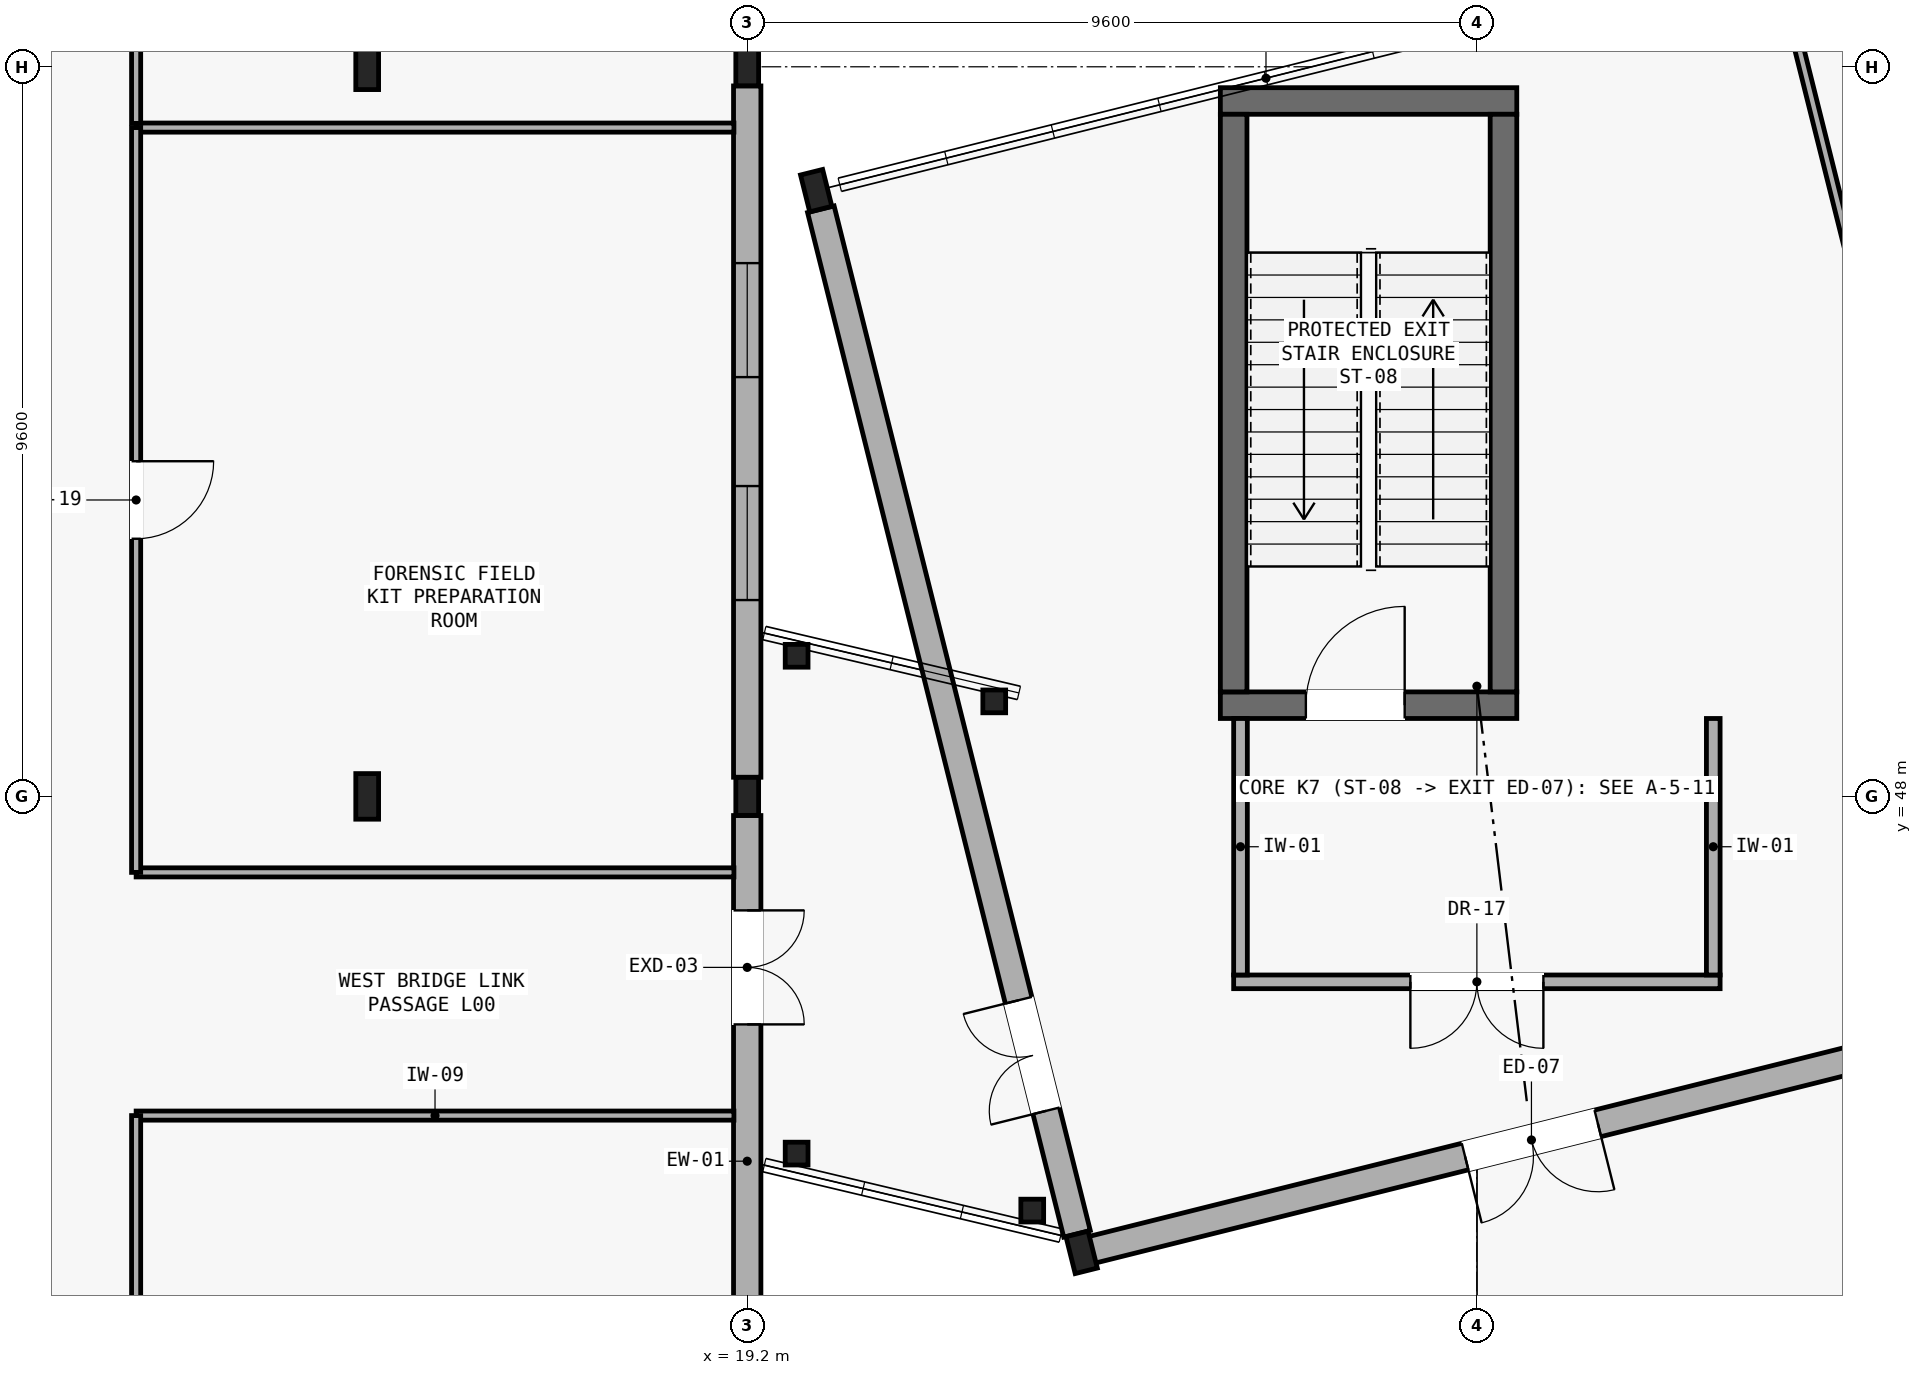
"""IFC4 building model, lengths in metres.
Left out: names, types, materials, properties, quantities, classifications, styles, units other than length and angle.
Written with IfcOpenShell. Run it as: python <this file> out.ifc"""

import sys

from ifc_helpers import new_model, si_unit, direction, frame, frame_2d, origin, origin_2d, place, context, subcontext, project, spatial, rectangle, i_section, extrude, element, fill, save


model = new_model("IFC4")
c1 = context("Model", 3, precision=1e-05, world=origin(), true_north=direction((0.0, 1.0)))
c2 = subcontext(c1, "Body", "Model", "MODEL_VIEW")
j1 = project(units=[si_unit("LENGTHUNIT", "METRE"), si_unit("PLANEANGLEUNIT", "RADIAN")], contexts=[c1])
p1 = place(None, origin())
s1 = spatial("IfcSite", under=j1, at=p1, CompositionType="ELEMENT")
p2 = place(p1, origin())
s2 = spatial("IfcBuilding", under=s1, at=p2, CompositionType="ELEMENT")
p3 = place(p2, origin())
s3 = spatial("IfcBuildingStorey", under=s2, at=p3, CompositionType="ELEMENT", Elevation=0.0)
for number, where, z_axis, x_axis in (
    (1, (19.85, 49.85, 0.0), (0.0, 0.0, 1.0), (1.0, 0.0, 0.0)),
    (2, (19.85, 43.3, 0.0), (0.0, 0.0, 1.0), (1.0, 0.0, 0.0)),
    (3, (22.45, 49.25, 0.0), (0.0, 0.0, 1.0), (1.0, 0.0, 0.0)),
    (4, (22.95, 42.55, 0.0), (0.0, 0.0, 1.0), (1.0, 0.0, 0.0)),
):
    element("IfcColumn", number, at=place(p3, frame(where, z_axis=z_axis, x_axis=x_axis)), inside=s3, PredefinedType="COLUMN", context=c2, shape_type="SweptSolid", body=[
        extrude(i_section(OverallWidth=0.3, OverallDepth=0.3, WebThickness=0.011, FlangeThickness=0.019, FilletRadius=0.027, at=origin_2d()), origin(), (0.0, 0.0, 1.0), 5.25),
    ])
p4 = place(p3, frame((19.2, 48.0, 0.0), z_axis=(0.0, 0.0, 1.0), x_axis=(1.0, 0.0, 0.0)))
e5 = element("IfcColumn", 5, at=p4, inside=s3, PredefinedType="COLUMN", context=c2, shape_type="SweptSolid", body=[
    extrude(i_section(OverallWidth=0.3, OverallDepth=0.5, WebThickness=0.014, FlangeThickness=0.028, FilletRadius=0.027, at=origin_2d()), origin(), (0.0, 0.0, 1.0), 5.25),
])
p5 = place(p3, frame((14.2, 48.0, 0.0), z_axis=(0.0, 0.0, 1.0), x_axis=(1.0, 0.0, 0.0)))
e6 = element("IfcColumn", 6, at=p5, inside=s3, PredefinedType="COLUMN", context=c2, shape_type="SweptSolid", body=[
    extrude(i_section(OverallWidth=0.3, OverallDepth=0.6, WebThickness=0.015, FlangeThickness=0.03, FilletRadius=0.027, at=origin_2d()), origin(), (0.0, 0.0, 1.0), 5.25),
])
p6 = place(p3, frame((19.2, 57.6, 0.0), z_axis=(0.0, 0.0, 1.0), x_axis=(1.0, 0.0, 0.0)))
e7 = element("IfcColumn", 7, at=p6, inside=s3, PredefinedType="COLUMN", context=c2, shape_type="SweptSolid", body=[
    extrude(i_section(OverallWidth=0.3, OverallDepth=0.5, WebThickness=0.014, FlangeThickness=0.028, FilletRadius=0.027, at=origin_2d()), origin(), (0.0, 0.0, 1.0), 5.25),
])
p7 = place(p3, frame((14.2, 57.6, 0.0), z_axis=(0.0, 0.0, 1.0), x_axis=(1.0, 0.0, 0.0)))
e8 = element("IfcColumn", 8, at=p7, inside=s3, PredefinedType="COLUMN", context=c2, shape_type="SweptSolid", body=[
    extrude(i_section(OverallWidth=0.3, OverallDepth=0.6, WebThickness=0.015, FlangeThickness=0.03, FilletRadius=0.027, at=origin_2d()), origin(), (0.0, 0.0, 1.0), 5.25),
])
for number, where, z_axis, x_axis in (
    (9, (23.6, 42.0, 0.0), (0.0, 0.0, 1.0), (0.97, 0.243, 0.0)),
    (10, (20.107, 55.97, 0.0), (0.0, 0.0, 1.0), (0.97, 0.243, 0.0)),
):
    element("IfcColumn", number, at=place(p3, frame(where, z_axis=z_axis, x_axis=x_axis)), inside=s3, PredefinedType="COLUMN", context=c2, shape_type="SweptSolid", body=[
        extrude(i_section(OverallWidth=0.3, OverallDepth=0.5, WebThickness=0.014, FlangeThickness=0.028, FilletRadius=0.027, at=origin_2d()), origin(), (0.0, 0.0, 1.0), 5.25),
    ])
p8 = place(p3, frame((19.2, 38.652, 0.0), z_axis=(0.0, 0.0, 1.0), x_axis=(0.0, 1.0, 0.0)))
e11 = element("IfcWall", 11, at=p8, inside=s3, PredefinedType="SOLIDWALL", context=c2, shape_type="SweptSolid", body=[
    extrude(rectangle(XDim=9.096, YDim=0.36, at=frame_2d((4.548, 0.0))), origin(), (0.0, 0.0, 1.0), 4.54),
])
p9 = place(p8, frame((6.348, 0.0, 0.0)))
e12 = element("IfcOpeningElement", 12, at=p9, cuts=e11, PredefinedType="OPENING", context=c2, shape_type="SweptSolid", body=[
    extrude(rectangle(XDim=1.5, YDim=2.2, at=frame_2d((0.75, 1.1))), frame((0.0, 0.19, 0.0), z_axis=(0.0, -1.0, 0.0), x_axis=(1.0, 0.0, 0.0)), (0.0, 0.0, 1.0), 0.38),
])
p10 = place(p3, frame((19.2, 48.252, 0.0), z_axis=(0.0, 0.0, 1.0), x_axis=(0.0, 1.0, 0.0)))
e13 = element("IfcWall", 13, at=p10, inside=s3, PredefinedType="SOLIDWALL", context=c2, shape_type="SweptSolid", body=[
    extrude(rectangle(XDim=9.096, YDim=0.36, at=frame_2d((4.548, 0.0))), origin(), (0.0, 0.0, 1.0), 4.54),
])
p11 = place(p10, frame((2.331, 0.0, 0.9)))
e14 = element("IfcOpeningElement", 14, at=p11, cuts=e13, PredefinedType="OPENING", context=c2, shape_type="SweptSolid", body=[
    extrude(rectangle(XDim=1.5, YDim=1.55, at=frame_2d((0.75, 0.775))), frame((0.0, 0.19, 0.0), z_axis=(0.0, -1.0, 0.0), x_axis=(1.0, 0.0, 0.0)), (0.0, 0.0, 1.0), 0.38),
])
p12 = place(p10, frame((5.265, 0.0, 0.9)))
e15 = element("IfcOpeningElement", 15, at=p12, cuts=e13, PredefinedType="OPENING", context=c2, shape_type="SweptSolid", body=[
    extrude(rectangle(XDim=1.5, YDim=1.55, at=frame_2d((0.75, 0.775))), frame((0.0, 0.19, 0.0), z_axis=(0.0, -1.0, 0.0), x_axis=(1.0, 0.0, 0.0)), (0.0, 0.0, 1.0), 0.38),
])
p13 = place(p3, frame((23.609, 42.002, 0.0), z_axis=(0.0, 0.0, 1.0), x_axis=(0.970140142249, 0.242545056429, 0.0)))
e16 = element("IfcWall", 16, at=p13, inside=s3, PredefinedType="SOLIDWALL", context=c2, shape_type="SweptSolid", body=[
    extrude(rectangle(XDim=12.182, YDim=0.36, at=frame_2d((6.091, 0.0))), origin(), (0.0, 0.0, 1.0), 4.67),
])
p14 = place(p13, frame((5.191, 0.0, 0.0)))
e17 = element("IfcOpeningElement", 17, at=p14, cuts=e16, PredefinedType="OPENING", context=c2, shape_type="SweptSolid", body=[
    extrude(rectangle(XDim=1.8, YDim=2.2, at=frame_2d((0.9, 1.1))), frame((0.0, 0.19, 0.0), z_axis=(0.0, -1.0, 0.0), x_axis=(1.0, 0.0, 0.0)), (0.0, 0.0, 1.0), 0.38),
])
p15 = place(p3, frame((23.539, 42.244, 0.0), z_axis=(0.0, 0.0, 1.0), x_axis=(-0.242523223331, 0.970145600487, 0.0)))
e18 = element("IfcWall", 18, at=p15, inside=s3, PredefinedType="SOLIDWALL", context=c2, shape_type="SweptSolid", body=[
    extrude(rectangle(XDim=13.896, YDim=0.36, at=frame_2d((6.948, 0.0))), origin(), (0.0, 0.0, 1.0), 4.44),
])
p16 = place(p15, frame((1.668, 0.0, 0.0)))
e19 = element("IfcOpeningElement", 19, at=p16, cuts=e18, PredefinedType="OPENING", context=c2, shape_type="SweptSolid", body=[
    extrude(rectangle(XDim=1.5, YDim=2.2, at=frame_2d((0.75, 1.1))), frame((0.0, 0.19, 0.0), z_axis=(0.0, -1.0, 0.0), x_axis=(1.0, 0.0, 0.0)), (0.0, 0.0, 1.0), 0.38),
])
p17 = place(p3, frame((25.425, 49.2, 0.0), z_axis=(0.0, 0.0, 1.0), x_axis=(1.0, 0.0, 0.0)))
e20 = element("IfcWall", 20, at=p17, inside=s3, PredefinedType="SHEAR", context=c2, shape_type="SweptSolid", body=[
    extrude(rectangle(XDim=3.9, YDim=0.35, at=frame_2d((1.95, 0.0))), origin(), (0.0, 0.0, 1.0), 5.0),
])
p18 = place(p17, frame((1.125, 0.0, 0.0)))
e21 = element("IfcOpeningElement", 21, at=p18, cuts=e20, PredefinedType="OPENING", context=c2, shape_type="SweptSolid", body=[
    extrude(rectangle(XDim=1.3, YDim=2.15, at=frame_2d((0.65, 1.075))), frame((0.0, 0.185, 0.0), z_axis=(0.0, -1.0, 0.0), x_axis=(1.0, 0.0, 0.0)), (0.0, 0.0, 1.0), 0.37),
])
p19 = place(p3, frame((25.425, 57.15, 0.0), z_axis=(0.0, 0.0, 1.0), x_axis=(1.0, 0.0, 0.0)))
e22 = element("IfcWall", 22, at=p19, inside=s3, PredefinedType="SHEAR", context=c2, shape_type="SweptSolid", body=[
    extrude(rectangle(XDim=3.9, YDim=0.35, at=frame_2d((1.95, 0.0))), origin(), (0.0, 0.0, 1.0), 5.0),
])
for number, where, z_axis, x_axis in (
    (23, (25.6, 49.375, 0.0), (0.0, 0.0, 1.0), (0.0, 1.0, 0.0)),
    (24, (29.15, 49.375, 0.0), (0.0, 0.0, 1.0), (0.0, 1.0, 0.0)),
):
    element("IfcWall", number, at=place(p3, frame(where, z_axis=z_axis, x_axis=x_axis)), inside=s3, PredefinedType="SHEAR", context=c2, shape_type="SweptSolid", body=[
        extrude(rectangle(XDim=7.6, YDim=0.35, at=frame_2d((3.8, 0.0))), origin(), (0.0, 0.0, 1.0), 5.0),
    ])
p20 = place(p3, frame((25.6, 45.56, 0.0), z_axis=(0.0, 0.0, 1.0), x_axis=(1.0, 0.0, 0.0)))
e25 = element("IfcWall", 25, at=p20, inside=s3, PredefinedType="PARTITIONING", context=c2, shape_type="SweptSolid", body=[
    extrude(rectangle(XDim=6.4, YDim=0.18, at=frame_2d((3.2, 0.0))), origin(), (0.0, 0.0, 1.0), 4.62),
])
p21 = place(p20, frame((2.325, 0.0, 0.0)))
e26 = element("IfcOpeningElement", 26, at=p21, cuts=e25, PredefinedType="OPENING", context=c2, shape_type="SweptSolid", body=[
    extrude(rectangle(XDim=1.75, YDim=2.15, at=frame_2d((0.875, 1.075))), frame((0.0, 0.1, 0.0), z_axis=(0.0, -1.0, 0.0), x_axis=(1.0, 0.0, 0.0)), (0.0, 0.0, 1.0), 0.2),
])
for number, where, z_axis, x_axis in (
    (27, (25.69, 45.65, 0.0), (0.0, 0.0, 1.0), (0.0, 1.0, 0.0)),
    (28, (31.91, 45.65, 0.0), (0.0, 0.0, 1.0), (0.0, 1.0, 0.0)),
):
    element("IfcWall", number, at=place(p3, frame(where, z_axis=z_axis, x_axis=x_axis)), inside=s3, PredefinedType="PARTITIONING", context=c2, shape_type="SweptSolid", body=[
        extrude(rectangle(XDim=3.375, YDim=0.18, at=frame_2d((1.688, 0.0))), origin(), (0.0, 0.0, 1.0), 5.0),
    ])
p22 = place(p3, frame((19.025, 43.8, 0.0), z_axis=(0.0, 0.0, 1.0), x_axis=(-1.0, 0.0, 0.0)))
e29 = element("IfcWall", 29, at=p22, inside=s3, PredefinedType="PARTITIONING", context=c2, shape_type="SweptSolid", body=[
    extrude(rectangle(XDim=7.865, YDim=0.12, at=frame_2d((3.933, 0.0))), origin(), (0.0, 0.0, 1.0), 5.0),
])
p23 = place(p3, frame((11.16, 43.8, 0.0), z_axis=(0.0, 0.0, 1.0), x_axis=(0.0, -1.0, 0.0)))
e30 = element("IfcWall", 30, at=p23, inside=s3, PredefinedType="PARTITIONING", context=c2, shape_type="SweptSolid", body=[
    extrude(rectangle(XDim=14.4, YDim=0.12, at=frame_2d((7.2, 0.0))), origin(), (0.0, 0.0, 1.0), 4.62),
])
p24 = place(p23, frame((6.71, 0.0, 0.0)))
e31 = element("IfcOpeningElement", 31, at=p24, cuts=e30, PredefinedType="OPENING", context=c2, shape_type="SweptSolid", body=[
    extrude(rectangle(XDim=0.98, YDim=2.1, at=frame_2d((0.49, 1.05))), frame((0.0, 0.07, 0.0), z_axis=(0.0, -1.0, 0.0), x_axis=(1.0, 0.0, 0.0)), (0.0, 0.0, 1.0), 0.14),
])
for number, where, z_axis, x_axis in (
    (32, (11.16, 47.0, 0.0), (0.0, 0.0, 1.0), (1.0, 0.0, 0.0)),
    (33, (19.025, 56.8, 0.0), (0.0, 0.0, 1.0), (-1.0, 0.0, 0.0)),
):
    element("IfcWall", number, at=place(p3, frame(where, z_axis=z_axis, x_axis=x_axis)), inside=s3, PredefinedType="PARTITIONING", context=c2, shape_type="SweptSolid", body=[
        extrude(rectangle(XDim=7.865, YDim=0.12, at=frame_2d((3.933, 0.0))), origin(), (0.0, 0.0, 1.0), 5.0),
    ])
p25 = place(p3, frame((11.16, 56.8, 0.0), z_axis=(0.0, 0.0, 1.0), x_axis=(0.0, -1.0, 0.0)))
e34 = element("IfcWall", 34, at=p25, inside=s3, PredefinedType="PARTITIONING", context=c2, shape_type="SweptSolid", body=[
    extrude(rectangle(XDim=9.8, YDim=0.12, at=frame_2d((4.9, 0.0))), origin(), (0.0, 0.0, 1.0), 4.62),
])
p26 = place(p25, frame((4.39, 0.0, 0.0)))
e35 = element("IfcOpeningElement", 35, at=p26, cuts=e34, PredefinedType="OPENING", context=c2, shape_type="SweptSolid", body=[
    extrude(rectangle(XDim=1.02, YDim=2.1, at=frame_2d((0.51, 1.05))), frame((0.0, 0.07, 0.0), z_axis=(0.0, -1.0, 0.0), x_axis=(1.0, 0.0, 0.0)), (0.0, 0.0, 1.0), 0.14),
])
p27 = place(p3, frame((11.16, 82.6, 0.0), z_axis=(0.0, 0.0, 1.0), x_axis=(0.0, -1.0, 0.0)))
e36 = element("IfcWall", 36, at=p27, inside=s3, PredefinedType="PARTITIONING", context=c2, shape_type="SweptSolid", body=[
    extrude(rectangle(XDim=25.745, YDim=0.12, at=frame_2d((12.873, 0.0))), origin(), (0.0, 0.0, 1.0), 4.62),
])
p28 = place(p27, frame((12.393, 0.0, 0.0)))
e37 = element("IfcOpeningElement", 37, at=p28, cuts=e36, PredefinedType="OPENING", context=c2, shape_type="SweptSolid", body=[
    extrude(rectangle(XDim=0.96, YDim=2.08, at=frame_2d((0.48, 1.04))), frame((0.0, 0.07, 0.0), z_axis=(0.0, -1.0, 0.0), x_axis=(1.0, 0.0, 0.0)), (0.0, 0.0, 1.0), 0.14),
])
p29 = place(p3, frame((32.74, 59.041, 0.0), z_axis=(0.0, 0.0, 1.0), x_axis=(0.242525471141, -0.970145038563, 0.0)))
e38 = element("IfcWall", 38, at=p29, inside=s3, PredefinedType="PARTITIONING", context=c2, shape_type="SweptSolid", body=[
    extrude(rectangle(XDim=11.315, YDim=0.12, at=frame_2d((5.657, 0.0))), origin(), (0.0, 0.0, 1.0), 5.0),
])
p30 = place(p9, frame((1.5, 0.0, 0.0), z_axis=(0.0, 0.0, 1.0), x_axis=(-1.0, 0.0, 0.0)))
e39 = element("IfcDoor", 39, at=p30, inside=s3, OperationType="SINGLE_SWING_LEFT", PredefinedType="DOOR", context=c2, shape_type="SweptSolid", body=[
    extrude(rectangle(XDim=1.5, YDim=2.2, at=frame_2d((0.75, 1.1))), frame((0.0, 0.025, 0.0), z_axis=(0.0, -1.0, 0.0), x_axis=(1.0, 0.0, 0.0)), (0.0, 0.0, 1.0), 0.05),
])
fill(e12, e39)
p31 = place(p11, origin())
e40 = element("IfcWindow", 40, at=p31, inside=s3, PartitioningType="SINGLE_PANEL", PredefinedType="WINDOW", context=c2, shape_type="SweptSolid", body=[
    extrude(rectangle(XDim=1.5, YDim=1.55, at=frame_2d((0.75, 0.775))), frame((0.0, 0.03, 0.0), z_axis=(0.0, -1.0, 0.0), x_axis=(1.0, 0.0, 0.0)), (0.0, 0.0, 1.0), 0.06),
])
fill(e14, e40)
p32 = place(p12, origin())
e41 = element("IfcWindow", 41, at=p32, inside=s3, PartitioningType="SINGLE_PANEL", PredefinedType="WINDOW", context=c2, shape_type="SweptSolid", body=[
    extrude(rectangle(XDim=1.5, YDim=1.55, at=frame_2d((0.75, 0.775))), frame((0.0, 0.03, 0.0), z_axis=(0.0, -1.0, 0.0), x_axis=(1.0, 0.0, 0.0)), (0.0, 0.0, 1.0), 0.06),
])
fill(e15, e41)
p33 = place(p14, frame((1.8, 0.0, 0.0), z_axis=(0.0, 0.0, 1.0), x_axis=(-1.0, 0.0, 0.0)))
e42 = element("IfcDoor", 42, at=p33, inside=s3, OperationType="SINGLE_SWING_LEFT", PredefinedType="DOOR", context=c2, shape_type="SweptSolid", body=[
    extrude(rectangle(XDim=1.8, YDim=2.2, at=frame_2d((0.9, 1.1))), frame((0.0, 0.025, 0.0), z_axis=(0.0, -1.0, 0.0), x_axis=(1.0, 0.0, 0.0)), (0.0, 0.0, 1.0), 0.05),
])
fill(e17, e42)
p34 = place(p16, origin())
e43 = element("IfcDoor", 43, at=p34, inside=s3, OperationType="SINGLE_SWING_LEFT", PredefinedType="DOOR", context=c2, shape_type="SweptSolid", body=[
    extrude(rectangle(XDim=1.5, YDim=2.2, at=frame_2d((0.75, 1.1))), frame((0.0, 0.025, 0.0), z_axis=(0.0, -1.0, 0.0), x_axis=(1.0, 0.0, 0.0)), (0.0, 0.0, 1.0), 0.05),
])
fill(e19, e43)
p35 = place(p18, origin())
e44 = element("IfcDoor", 44, at=p35, inside=s3, OperationType="SINGLE_SWING_RIGHT", PredefinedType="DOOR", context=c2, shape_type="SweptSolid", body=[
    extrude(rectangle(XDim=1.3, YDim=2.15, at=frame_2d((0.65, 1.075))), frame((0.0, 0.025, 0.0), z_axis=(0.0, -1.0, 0.0), x_axis=(1.0, 0.0, 0.0)), (0.0, 0.0, 1.0), 0.05),
])
fill(e21, e44)
p36 = place(p21, frame((1.75, 0.0, 0.0), z_axis=(0.0, 0.0, 1.0), x_axis=(-1.0, 0.0, 0.0)))
e45 = element("IfcDoor", 45, at=p36, inside=s3, OperationType="DOUBLE_DOOR_SINGLE_SWING", PredefinedType="DOOR", context=c2, shape_type="SweptSolid", body=[
    extrude(rectangle(XDim=1.75, YDim=2.15, at=frame_2d((0.875, 1.075))), frame((0.0, 0.025, 0.0), z_axis=(0.0, -1.0, 0.0), x_axis=(1.0, 0.0, 0.0)), (0.0, 0.0, 1.0), 0.05),
])
fill(e26, e45)
p37 = place(p26, origin())
e46 = element("IfcDoor", 46, at=p37, inside=s3, OperationType="SINGLE_SWING_LEFT", PredefinedType="DOOR", context=c2, shape_type="SweptSolid", body=[
    extrude(rectangle(XDim=1.02, YDim=2.1, at=frame_2d((0.51, 1.05))), frame((0.0, 0.025, 0.0), z_axis=(0.0, -1.0, 0.0), x_axis=(1.0, 0.0, 0.0)), (0.0, 0.0, 1.0), 0.05),
])
fill(e35, e46)
save(model, sys.argv[1])
